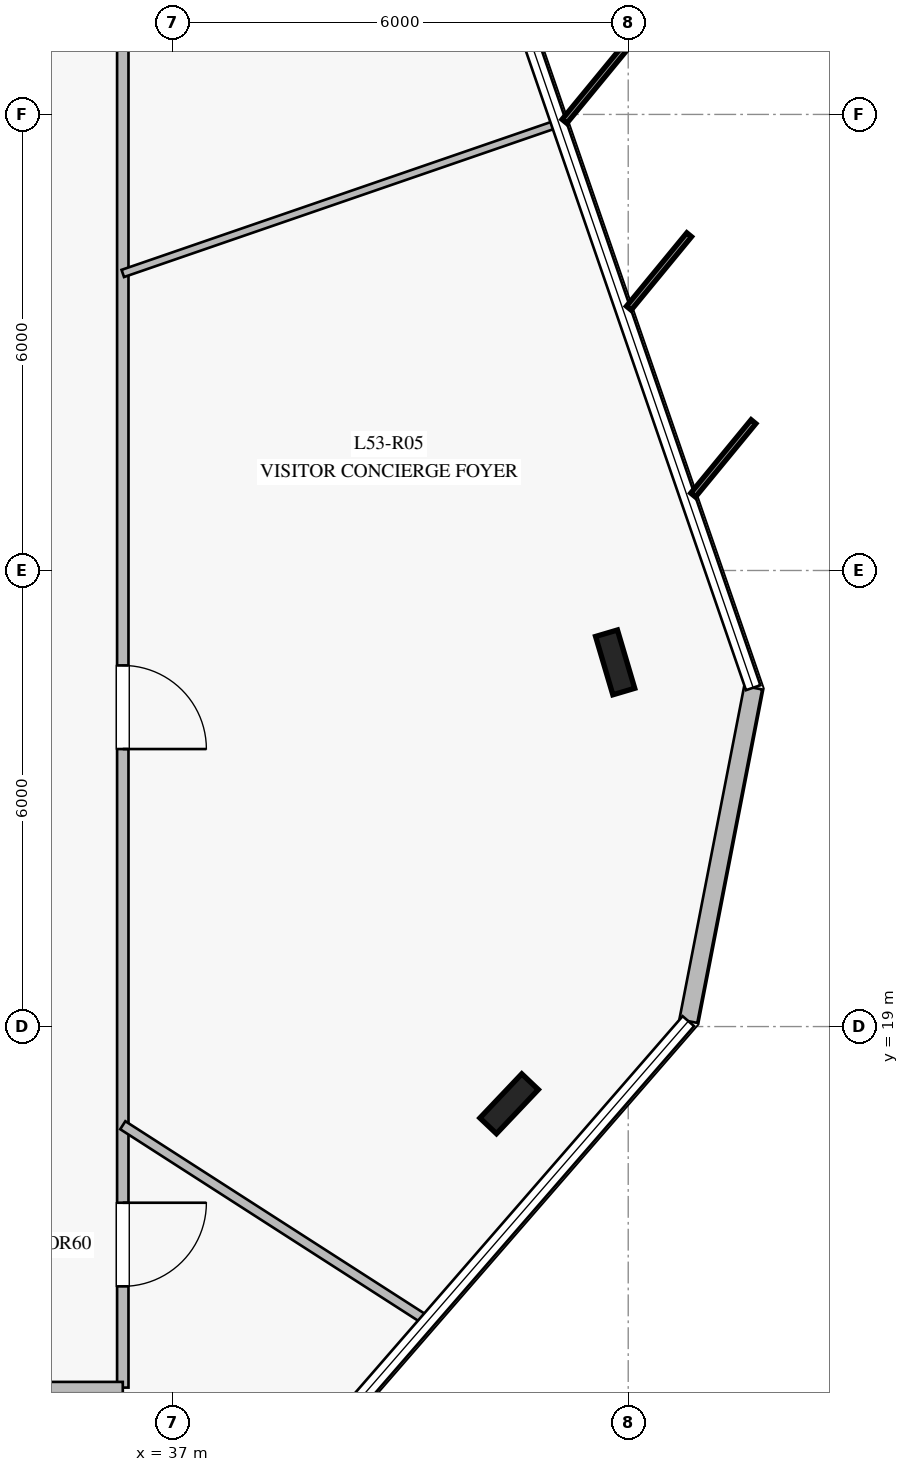
"""IFC4 building model, lengths in metres.
Left out: names, types, materials, properties, quantities, classifications, styles, units other than length and angle.
Written with IfcOpenShell. Run it as: python <this file> out.ifc"""

import sys

from ifc_helpers import new_model, si_unit, direction, frame, frame_2d, origin, origin_2d, place, context, subcontext, project, spatial, rectangle, i_section, extrude, element, fill, save


model = new_model("IFC4")
c1 = context("Model", 3, precision=1e-05, world=origin(), true_north=direction((0.0, 1.0)))
c2 = subcontext(c1, "Body", "Model", "MODEL_VIEW")
j1 = project(units=[si_unit("LENGTHUNIT", "METRE"), si_unit("PLANEANGLEUNIT", "RADIAN")], contexts=[c1])
p1 = place(None, origin())
s1 = spatial("IfcSite", under=j1, at=p1, CompositionType="ELEMENT")
p2 = place(p1, origin())
s2 = spatial("IfcBuilding", under=s1, at=p2, CompositionType="ELEMENT")
p3 = place(p2, frame((0.0, 0.0, 220.8)))
s3 = spatial("IfcBuildingStorey", under=s2, at=p3, CompositionType="ELEMENT", Elevation=220.8)
for number, where, z_axis, x_axis in (
    (1, (41.433, 17.984, 0.0), (0.0, 0.0, 1.0), (0.688, 0.725, 0.0)),
    (2, (42.828, 23.791, 0.0), (0.0, 0.0, 1.0), (-0.284, 0.959, 0.0)),
):
    element("IfcColumn", number, at=place(p3, frame(where, z_axis=z_axis, x_axis=x_axis)), inside=s3, PredefinedType="COLUMN", context=c2, shape_type="SweptSolid", body=[
        extrude(i_section(OverallWidth=0.3, OverallDepth=0.8, WebThickness=0.018, FlangeThickness=0.033, at=origin_2d()), origin(), (0.0, 0.0, 1.0), 4.0),
    ])
p4 = place(p3, frame((43.791, 19.071, 0.0), z_axis=(0.0, 0.0, 1.0), x_axis=(0.190871121271, 0.981615105357, 0.0)))
e3 = element("IfcWall", 3, at=p4, inside=s3, PredefinedType="STANDARD", context=c2, shape_type="SweptSolid", body=[
    extrude(rectangle(XDim=4.469, YDim=0.24, at=frame_2d((2.235, 0.0))), origin(), (0.0, 0.0, 1.0), 3.78),
])
p5 = place(p3, frame((36.35, 35.75, 0.0), z_axis=(0.0, 0.0, 1.0), x_axis=(0.0, -1.0, 0.0)))
e4 = element("IfcWall", 4, at=p5, inside=s3, PredefinedType="PARTITIONING", context=c2, shape_type="SweptSolid", body=[
    extrude(rectangle(XDim=21.5, YDim=0.15, at=frame_2d((10.75, 0.0))), origin(), (0.0, 0.0, 1.0), 3.05),
])
p6 = place(p5, frame((19.068, 0.0, 0.0)))
e5 = element("IfcOpeningElement", 5, at=p6, cuts=e4, PredefinedType="OPENING", context=c2, shape_type="SweptSolid", body=[
    extrude(rectangle(XDim=1.1, YDim=2.2, at=frame_2d((0.55, 1.1))), frame((0.0, 0.085, 0.0), z_axis=(0.0, -1.0, 0.0), x_axis=(1.0, 0.0, 0.0)), (0.0, 0.0, 1.0), 0.17),
])
p7 = place(p5, frame((11.999, 0.0, 0.0)))
e6 = element("IfcOpeningElement", 6, at=p7, cuts=e4, PredefinedType="OPENING", context=c2, shape_type="SweptSolid", body=[
    extrude(rectangle(XDim=1.1, YDim=2.2, at=frame_2d((0.55, 1.1))), frame((0.0, 0.085, 0.0), z_axis=(0.0, -1.0, 0.0), x_axis=(1.0, 0.0, 0.0)), (0.0, 0.0, 1.0), 0.17),
])
p8 = place(p3, frame((36.35, 14.25, 0.0), z_axis=(0.0, 0.0, 1.0), x_axis=(-1.0, 0.0, 0.0)))
e7 = element("IfcWall", 7, at=p8, inside=s3, PredefinedType="PARTITIONING", context=c2, shape_type="SweptSolid", body=[
    extrude(rectangle(XDim=22.7, YDim=0.15, at=frame_2d((11.35, 0.0))), origin(), (0.0, 0.0, 1.0), 3.28),
])
p9 = place(p8, frame((16.461, 0.0, 0.0)))
e8 = element("IfcOpeningElement", 8, at=p9, cuts=e7, PredefinedType="OPENING", context=c2, shape_type="SweptSolid", body=[
    extrude(rectangle(XDim=1.1, YDim=2.2, at=frame_2d((0.55, 1.1))), frame((0.0, 0.085, 0.0), z_axis=(0.0, -1.0, 0.0), x_axis=(1.0, 0.0, 0.0)), (0.0, 0.0, 1.0), 0.17),
])
p10 = place(p3, frame((36.35, 17.702, 0.0), z_axis=(0.0, 0.0, 1.0), x_axis=(0.841170126026, -0.540770578972, 0.0)))
e9 = element("IfcWall", 9, at=p10, inside=s3, PredefinedType="PARTITIONING", context=c2, shape_type="SweptSolid", body=[
    extrude(rectangle(XDim=4.75, YDim=0.125, at=frame_2d((2.375, 0.0))), origin(), (0.0, 0.0, 1.0), 3.18),
])
p11 = place(p3, frame((36.35, 28.908, 0.0), z_axis=(0.0, 0.0, 1.0), x_axis=(0.945513966892, 0.325581538807, 0.0)))
e10 = element("IfcWall", 10, at=p11, inside=s3, PredefinedType="MOVABLE", context=c2, shape_type="SweptSolid", body=[
    extrude(rectangle(XDim=6.051, YDim=0.1, at=frame_2d((3.025, 0.0))), origin(), (0.0, 0.0, 1.0), 3.05),
])
p12 = place(p6, origin())
e11 = element("IfcDoor", 11, at=p12, inside=s3, OperationType="SINGLE_SWING_LEFT", PredefinedType="DOOR", context=c2, shape_type="SweptSolid", body=[
    extrude(rectangle(XDim=1.1, YDim=2.2, at=frame_2d((0.55, 1.1))), frame((0.0, 0.025, 0.0), z_axis=(0.0, -1.0, 0.0), x_axis=(1.0, 0.0, 0.0)), (0.0, 0.0, 1.0), 0.05),
])
fill(e5, e11)
p13 = place(p7, origin())
e12 = element("IfcDoor", 12, at=p13, inside=s3, OperationType="SINGLE_SWING_RIGHT", PredefinedType="DOOR", context=c2, shape_type="SweptSolid", body=[
    extrude(rectangle(XDim=1.1, YDim=2.2, at=frame_2d((0.55, 1.1))), frame((0.0, 0.025, 0.0), z_axis=(0.0, -1.0, 0.0), x_axis=(1.0, 0.0, 0.0)), (0.0, 0.0, 1.0), 0.05),
])
fill(e6, e12)
save(model, sys.argv[1])
